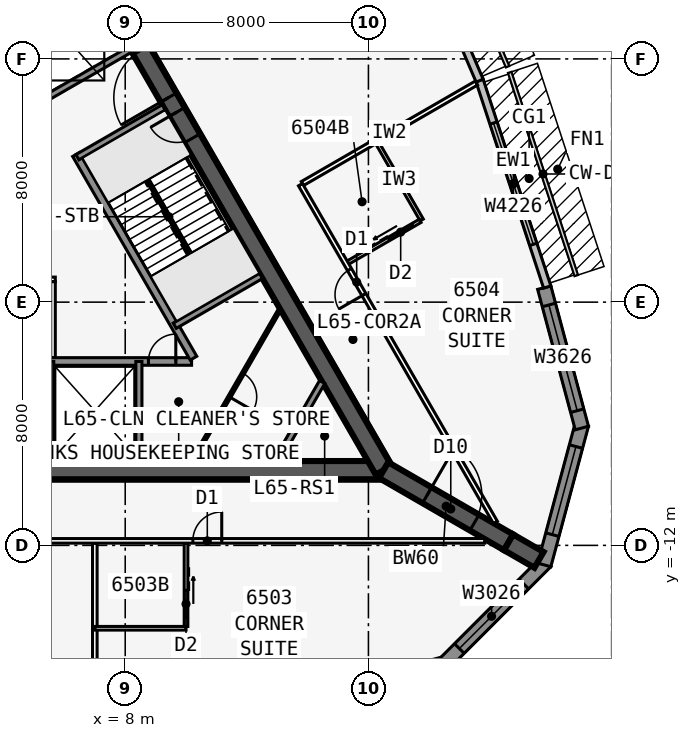
"""IFC4 building model, lengths in metres.
Left out: names, types, materials, properties, quantities, classifications, styles, units other than length and angle.
Written with IfcOpenShell. Run it as: python <this file> out.ifc"""

import sys

from ifc_helpers import new_model, si_unit, direction, frame, frame_2d, origin, place, context, subcontext, project, spatial, polyline, rectangle, outline, extrude, element, fill, save


model = new_model("IFC4")
c1 = context("Model", 3, precision=1e-05, world=origin(), true_north=direction((0.0, 1.0)))
c2 = subcontext(c1, "Body", "Model", "MODEL_VIEW")
j1 = project(units=[si_unit("LENGTHUNIT", "METRE"), si_unit("PLANEANGLEUNIT", "RADIAN")], contexts=[c1])
p1 = place(None, origin())
s1 = spatial("IfcSite", under=j1, at=p1, CompositionType="ELEMENT")
p2 = place(p1, origin())
s2 = spatial("IfcBuilding", under=s1, at=p2, CompositionType="ELEMENT")
p3 = place(p2, frame((0.0, 0.0, 246.5)))
s3 = spatial("IfcBuildingStorey", under=s2, at=p3, CompositionType="ELEMENT", Elevation=246.5)
p4 = place(p3, frame((-16.5, -9.526, 0.0), z_axis=(0.0, 0.0, 1.0), x_axis=(1.0, 0.0, 0.0)))
e1 = element("IfcWall", 1, at=p4, inside=s3, PredefinedType="SHEAR", context=c2, shape_type="SweptSolid", body=[
    extrude(rectangle(XDim=33.0, YDim=0.6, at=frame_2d((16.5, 0.0))), origin(), (0.0, 0.0, 1.0), 3.6),
])
p5 = place(p4, frame((14.05, 0.0, 0.0)))
e2 = element("IfcOpeningElement", 2, at=p5, cuts=e1, PredefinedType="OPENING", context=c2, shape_type="SweptSolid", body=[
    extrude(rectangle(XDim=1.8, YDim=2.13, at=frame_2d((0.9, 1.065))), frame((0.0, 0.31, 0.0), z_axis=(0.0, -1.0, 0.0), x_axis=(1.0, 0.0, 0.0)), (0.0, 0.0, 1.0), 0.62),
])
p6 = place(p3, frame((-0.55, -5.951, 0.0), z_axis=(0.0, 0.0, 1.0), x_axis=(1.0, 0.0, 0.0)))
e3 = element("IfcWall", 3, at=p6, inside=s3, PredefinedType="SOLIDWALL", context=c2, shape_type="SweptSolid", body=[
    extrude(rectangle(XDim=10.733, YDim=0.25, at=frame_2d((5.366, 0.0))), origin(), (0.0, 0.0, 1.0), 3.435),
])
p7 = place(p6, frame((9.314, 0.0, 0.0)))
e4 = element("IfcOpeningElement", 4, at=p7, cuts=e3, PredefinedType="OPENING", context=c2, shape_type="SweptSolid", body=[
    extrude(rectangle(XDim=0.9, YDim=2.13, at=frame_2d((0.45, 1.065))), frame((0.0, 0.135, 0.0), z_axis=(0.0, -1.0, 0.0), x_axis=(1.0, 0.0, 0.0)), (0.0, 0.0, 1.0), 0.27),
])
p8 = place(p6, frame((1.05, 0.0, 0.0)))
e5 = element("IfcOpeningElement", 5, at=p8, cuts=e3, PredefinedType="OPENING", context=c2, shape_type="SweptSolid", body=[
    extrude(rectangle(XDim=1.1, YDim=2.13, at=frame_2d((0.55, 1.065))), frame((0.0, 0.135, 0.0), z_axis=(0.0, -1.0, 0.0), x_axis=(1.0, 0.0, 0.0)), (0.0, 0.0, 1.0), 0.27),
])
p9 = place(p6, frame((4.05, 0.0, 0.0)))
e6 = element("IfcOpeningElement", 6, at=p9, cuts=e3, PredefinedType="OPENING", context=c2, shape_type="SweptSolid", body=[
    extrude(rectangle(XDim=1.1, YDim=2.13, at=frame_2d((0.55, 1.065))), frame((0.0, 0.135, 0.0), z_axis=(0.0, -1.0, 0.0), x_axis=(1.0, 0.0, 0.0)), (0.0, 0.0, 1.0), 0.27),
])
for number, where, z_axis, x_axis in (
    (7, (5.55, -5.951, 0.0), (0.0, 0.0, 1.0), (0.0, -1.0, 0.0)),
    (8, (8.45, -5.951, 0.0), (0.0, 0.0, 1.0), (0.0, -1.0, 0.0)),
):
    element("IfcWall", number, at=place(p3, frame(where, z_axis=z_axis, x_axis=x_axis)), inside=s3, PredefinedType="SOLIDWALL", context=c2, shape_type="SweptSolid", body=[
        extrude(rectangle(XDim=3.275, YDim=0.2, at=frame_2d((1.637, 0.0))), origin(), (0.0, 0.0, 1.0), 3.435),
    ])
p10 = place(p3, frame((16.5, -9.526, 0.0), z_axis=(0.0, 0.0, 1.0), x_axis=(-0.499999749417, 0.866025548458, 0.0)))
e9 = element("IfcWall", 9, at=p10, inside=s3, PredefinedType="SHEAR", context=c2, shape_type="SweptSolid", body=[
    extrude(rectangle(XDim=33.0, YDim=0.6, at=frame_2d((16.5, 0.0))), origin(), (0.0, 0.0, 1.0), 3.6),
])
p11 = place(p10, frame((14.15, 0.0, 0.0)))
e10 = element("IfcOpeningElement", 10, at=p11, cuts=e9, PredefinedType="OPENING", context=c2, shape_type="SweptSolid", body=[
    extrude(rectangle(XDim=1.8, YDim=2.13, at=frame_2d((0.9, 1.065))), frame((0.0, 0.31, 0.0), z_axis=(0.0, -1.0, 0.0), x_axis=(1.0, 0.0, 0.0)), (0.0, 0.0, 1.0), 0.62),
])
p12 = place(p10, frame((12.6, 0.0, 0.0)))
e11 = element("IfcOpeningElement", 11, at=p12, cuts=e9, PredefinedType="OPENING", context=c2, shape_type="SweptSolid", body=[
    extrude(rectangle(XDim=1.0, YDim=2.13, at=frame_2d((0.5, 1.065))), frame((0.0, 0.31, 0.0), z_axis=(0.0, -1.0, 0.0), x_axis=(1.0, 0.0, 0.0)), (0.0, 0.0, 1.0), 0.62),
])
p13 = place(p3, frame((10.245, -5.843, 0.0), z_axis=(0.0, 0.0, 1.0), x_axis=(-0.499993009313, 0.866029439822, 0.0)))
e12 = element("IfcWall", 12, at=p13, inside=s3, PredefinedType="SOLIDWALL", context=c2, shape_type="SweptSolid", body=[
    extrude(rectangle(XDim=7.733, YDim=0.25, at=frame_2d((3.866, 0.0))), origin(), (0.0, 0.0, 1.0), 3.435),
])
p14 = place(p3, frame((9.629, -4.775, 0.0), z_axis=(0.0, 0.0, 1.0), x_axis=(0.865995643347, 0.500051543047, 0.0)))
e13 = element("IfcWall", 13, at=p14, inside=s3, PredefinedType="SOLIDWALL", context=c2, shape_type="SweptSolid", body=[
    extrude(rectangle(XDim=3.275, YDim=0.2, at=frame_2d((1.638, 0.0))), origin(), (0.0, 0.0, 1.0), 3.435),
])
for number, where, z_axis, x_axis in (
    (14, (6.429, 0.767, 0.0), (0.0, 0.0, 1.0), (0.866, 0.5, 0.0)),
    (15, (5.329, 2.673, 0.0), (0.0, 0.0, 1.0), (0.866, 0.5, 0.0)),
):
    element("IfcWall", number, at=place(p3, frame(where, z_axis=z_axis, x_axis=x_axis)), inside=s3, PredefinedType="SOLIDWALL", context=c2, shape_type="SweptSolid", body=[
        extrude(rectangle(XDim=3.275, YDim=0.2, at=frame_2d((1.637, 0.0))), origin(), (0.0, 0.0, 1.0), 3.435),
    ])
p15 = place(p3, frame((16.5, -9.526, 0.0), z_axis=(0.0, 0.0, 1.0), x_axis=(0.866031398331, -0.499989616998, 0.0)))
e16 = element("IfcWall", 16, at=p15, inside=s3, PredefinedType="SHEAR", context=c2, shape_type="SweptSolid", body=[
    extrude(rectangle(XDim=4.746, YDim=0.6, at=frame_2d((2.373, 0.0))), origin(), (0.0, 0.0, 1.0), 3.6),
])
p16 = place(p15, frame((1.65, 0.0, 0.0)))
e17 = element("IfcOpeningElement", 17, at=p16, cuts=e16, PredefinedType="OPENING", context=c2, shape_type="SweptSolid", body=[
    extrude(rectangle(XDim=1.8, YDim=2.13, at=frame_2d((0.9, 1.065))), frame((0.0, 0.31, 0.0), z_axis=(0.0, -1.0, 0.0), x_axis=(1.0, 0.0, 0.0)), (0.0, 0.0, 1.0), 0.62),
])
p17 = place(p3, frame((20.61, -11.899, 0.0), z_axis=(0.0, 0.0, 1.0), x_axis=(0.866009537788, -0.500027479704, 0.0)))
e18 = element("IfcWall", 18, at=p17, inside=s3, PredefinedType="SHEAR", context=c2, shape_type="SweptSolid", body=[
    extrude(rectangle(XDim=1.155, YDim=0.6, at=frame_2d((0.577, 0.0))), origin(), (0.0, 0.0, 1.0), 3.6),
])
p18 = place(p3, frame((13.942, -17.103, 0.0), z_axis=(0.0, 0.0, 1.0), x_axis=(0.965913862671, 0.258863689806, 0.0)))
e19 = element("IfcWall", 19, at=p18, inside=s3, PredefinedType="SOLIDWALL", context=c2, shape_type="SweptSolid", body=[
    extrude(rectangle(XDim=4.782, YDim=0.45, at=frame_2d((2.391, 0.0))), origin(), (0.0, 0.0, 1.0), 3.435),
])
p19 = place(p18, frame((0.591, 0.0, 0.45)))
e20 = element("IfcOpeningElement", 20, at=p19, cuts=e19, PredefinedType="OPENING", context=c2, shape_type="SweptSolid", body=[
    extrude(rectangle(XDim=3.6, YDim=2.6, at=frame_2d((1.8, 1.3))), frame((0.0, 0.235, 0.0), z_axis=(0.0, -1.0, 0.0), x_axis=(1.0, 0.0, 0.0)), (0.0, 0.0, 1.0), 0.47),
])
p20 = place(p3, frame((18.46, -15.924, 0.0), z_axis=(0.0, 0.0, 1.0), x_axis=(0.707081252484, 0.707132308968, 0.0)))
e21 = element("IfcWall", 21, at=p20, inside=s3, PredefinedType="SOLIDWALL", context=c2, shape_type="SweptSolid", body=[
    extrude(outline(polyline([(4.782, 0.225), (4.723, 0.225), (4.375, 0.132), (4.351, 0.225), (0.0, 0.225), (0.0, -0.225), (4.782, -0.225), (4.782, 0.225)])), origin(), (0.0, 0.0, 1.0), 3.435),
])
p21 = place(p20, frame((0.75, 0.0, 0.45)))
e22 = element("IfcOpeningElement", 22, at=p21, cuts=e21, PredefinedType="OPENING", context=c2, shape_type="SweptSolid", body=[
    extrude(rectangle(XDim=3.0, YDim=2.6, at=frame_2d((1.5, 1.3))), frame((0.0, 0.235, 0.0), z_axis=(0.0, -1.0, 0.0), x_axis=(1.0, 0.0, 0.0)), (0.0, 0.0, 1.0), 0.47),
])
p22 = place(p3, frame((21.783, -12.644, 0.0), z_axis=(0.0, 0.0, 1.0), x_axis=(0.25880328844, 0.965930048136, 0.0)))
e23 = element("IfcWall", 23, at=p22, inside=s3, PredefinedType="SOLIDWALL", context=c2, shape_type="SweptSolid", body=[
    extrude(outline(polyline([(4.782, 0.225), (0.431, 0.225), (0.406, 0.132), (0.06, 0.225), (0.0, 0.225), (0.0, -0.225), (4.782, -0.225), (4.782, 0.225)])), origin(), (0.0, 0.0, 1.0), 3.435),
])
p23 = place(p22, frame((1.031, 0.0, 0.45)))
e24 = element("IfcOpeningElement", 24, at=p23, cuts=e23, PredefinedType="OPENING", context=c2, shape_type="SweptSolid", body=[
    extrude(rectangle(XDim=3.0, YDim=2.6, at=frame_2d((1.5, 1.3))), frame((0.0, 0.235, 0.0), z_axis=(0.0, -1.0, 0.0), x_axis=(1.0, 0.0, 0.0)), (0.0, 0.0, 1.0), 0.47),
])
p24 = place(p3, frame((23.02, -8.141, 0.0), z_axis=(0.0, 0.0, 1.0), x_axis=(-0.25880328844, 0.965930048136, 0.0)))
e25 = element("IfcWall", 25, at=p24, inside=s3, PredefinedType="SOLIDWALL", context=c2, shape_type="SweptSolid", body=[
    extrude(rectangle(XDim=4.782, YDim=0.45, at=frame_2d((2.391, 0.0))), origin(), (0.0, 0.0, 1.0), 3.435),
])
p25 = place(p24, frame((0.591, 0.0, 0.45)))
e26 = element("IfcOpeningElement", 26, at=p25, cuts=e25, PredefinedType="OPENING", context=c2, shape_type="SweptSolid", body=[
    extrude(rectangle(XDim=3.6, YDim=2.6, at=frame_2d((1.8, 1.3))), frame((0.0, 0.235, 0.0), z_axis=(0.0, -1.0, 0.0), x_axis=(1.0, 0.0, 0.0)), (0.0, 0.0, 1.0), 0.47),
])
p26 = place(p3, frame((21.881, -3.503, 0.0), z_axis=(0.0, 0.0, 1.0), x_axis=(-0.311328857048, 0.95030223759, 0.0)))
e27 = element("IfcWall", 27, at=p26, inside=s3, PredefinedType="STANDARD", context=c2, shape_type="SweptSolid", body=[
    extrude(rectangle(XDim=7.153, YDim=0.25, at=frame_2d((3.576, 0.0))), origin(), (0.0, 0.0, 1.0), 3.435),
])
p27 = place(p26, frame((1.476, 0.0, 0.45)))
e28 = element("IfcOpeningElement", 28, at=p27, cuts=e27, PredefinedType="OPENING", context=c2, shape_type="SweptSolid", body=[
    extrude(rectangle(XDim=4.2, YDim=2.6, at=frame_2d((2.1, 1.3))), frame((0.0, 0.135, 0.0), z_axis=(0.0, -1.0, 0.0), x_axis=(1.0, 0.0, 0.0)), (0.0, 0.0, 1.0), 0.27),
])
p28 = place(p3, frame((19.658, 3.284, 0.0), z_axis=(0.0, 0.0, 1.0), x_axis=(-0.393290226175, 0.91941437774, 0.0)))
e29 = element("IfcWall", 29, at=p28, inside=s3, PredefinedType="STANDARD", context=c2, shape_type="SweptSolid", body=[
    extrude(rectangle(XDim=2.014, YDim=0.25, at=frame_2d((1.007, 0.0))), origin(), (0.0, 0.0, 1.0), 3.435),
])
p29 = place(p3, frame((-19.827, -11.851, 0.0), z_axis=(0.0, 0.0, 1.0), x_axis=(1.0, 0.0, 0.0)))
e30 = element("IfcWall", 30, at=p29, inside=s3, PredefinedType="PARTITIONING", context=c2, shape_type="SweptSolid", body=[
    extrude(rectangle(XDim=39.654, YDim=0.15, at=frame_2d((19.827, 0.0))), origin(), (0.0, 0.0, 1.0), 3.435),
])
p30 = place(p29, frame((8.652, 0.0, 0.0)))
e31 = element("IfcOpeningElement", 31, at=p30, cuts=e30, PredefinedType="OPENING", context=c2, shape_type="SweptSolid", body=[
    extrude(rectangle(XDim=0.95, YDim=2.13, at=frame_2d((0.475, 1.065))), frame((0.0, 0.085, 0.0), z_axis=(0.0, -1.0, 0.0), x_axis=(1.0, 0.0, 0.0)), (0.0, 0.0, 1.0), 0.17),
])
p31 = place(p29, frame((15.827, 0.0, 0.0)))
e32 = element("IfcOpeningElement", 32, at=p31, cuts=e30, PredefinedType="OPENING", context=c2, shape_type="SweptSolid", body=[
    extrude(rectangle(XDim=1.0, YDim=2.13, at=frame_2d((0.5, 1.065))), frame((0.0, 0.085, 0.0), z_axis=(0.0, -1.0, 0.0), x_axis=(1.0, 0.0, 0.0)), (0.0, 0.0, 1.0), 0.17),
])
p32 = place(p29, frame((23.052, 0.0, 0.0)))
e33 = element("IfcOpeningElement", 33, at=p32, cuts=e30, PredefinedType="OPENING", context=c2, shape_type="SweptSolid", body=[
    extrude(rectangle(XDim=0.95, YDim=2.13, at=frame_2d((0.475, 1.065))), frame((0.0, 0.085, 0.0), z_axis=(0.0, -1.0, 0.0), x_axis=(1.0, 0.0, 0.0)), (0.0, 0.0, 1.0), 0.17),
])
p33 = place(p29, frame((30.052, 0.0, 0.0)))
e34 = element("IfcOpeningElement", 34, at=p33, cuts=e30, PredefinedType="OPENING", context=c2, shape_type="SweptSolid", body=[
    extrude(rectangle(XDim=0.95, YDim=2.13, at=frame_2d((0.475, 1.065))), frame((0.0, 0.085, 0.0), z_axis=(0.0, -1.0, 0.0), x_axis=(1.0, 0.0, 0.0)), (0.0, 0.0, 1.0), 0.17),
])
p34 = place(p3, frame((7.0, -11.926, 0.0), z_axis=(0.0, 0.0, 1.0), x_axis=(0.0, -1.0, 0.0)))
e35 = element("IfcWall", 35, at=p34, inside=s3, PredefinedType="PARTITIONING", context=c2, shape_type="SweptSolid", body=[
    extrude(rectangle(XDim=6.609, YDim=0.15, at=frame_2d((3.304, 0.0))), origin(), (0.0, 0.0, 1.0), 2.678),
])
p35 = place(p3, frame((7.0, -14.726, 0.0), z_axis=(0.0, 0.0, 1.0), x_axis=(1.0, 0.0, 0.0)))
e36 = element("IfcWall", 36, at=p35, inside=s3, PredefinedType="PLUMBINGWALL", context=c2, shape_type="SweptSolid", body=[
    extrude(rectangle(XDim=3.0, YDim=0.12, at=frame_2d((1.5, 0.0))), origin(), (0.0, 0.0, 1.0), 3.435),
])
p36 = place(p3, frame((10.0, -11.926, 0.0), z_axis=(0.0, 0.0, 1.0), x_axis=(0.0, -1.0, 0.0)))
e37 = element("IfcWall", 37, at=p36, inside=s3, PredefinedType="PLUMBINGWALL", context=c2, shape_type="SweptSolid", body=[
    extrude(rectangle(XDim=2.74, YDim=0.12, at=frame_2d((1.37, 0.0))), origin(), (0.0, 0.0, 1.0), 3.435),
])
p37 = place(p36, frame((1.55, 0.0, 0.0)))
e38 = element("IfcOpeningElement", 38, at=p37, cuts=e37, PredefinedType="OPENING", context=c2, shape_type="SweptSolid", body=[
    extrude(rectangle(XDim=0.9, YDim=2.13, at=frame_2d((0.45, 1.065))), frame((0.0, 0.07, 0.0), z_axis=(0.0, -1.0, 0.0), x_axis=(1.0, 0.0, 0.0)), (0.0, 0.0, 1.0), 0.14),
])
p38 = place(p3, frame((20.177, -11.245, 0.0), z_axis=(0.0, 0.0, 1.0), x_axis=(-0.49999979161, 0.866025524098, 0.0)))
e39 = element("IfcWall", 39, at=p38, inside=s3, PredefinedType="PARTITIONING", context=c2, shape_type="SweptSolid", body=[
    extrude(rectangle(XDim=12.827, YDim=0.15, at=frame_2d((6.414, 0.0))), origin(), (0.0, 0.0, 1.0), 3.435),
])
p39 = place(p38, frame((8.652, 0.0, 0.0)))
e40 = element("IfcOpeningElement", 40, at=p39, cuts=e39, PredefinedType="OPENING", context=c2, shape_type="SweptSolid", body=[
    extrude(rectangle(XDim=0.95, YDim=2.13, at=frame_2d((0.475, 1.065))), frame((0.0, 0.085, 0.0), z_axis=(0.0, -1.0, 0.0), x_axis=(1.0, 0.0, 0.0)), (0.0, 0.0, 1.0), 0.17),
])
p40 = place(p3, frame((13.829, -0.099, 0.0), z_axis=(0.0, 0.0, 1.0), x_axis=(0.866022562216, 0.500004921708, 0.0)))
e41 = element("IfcWall", 41, at=p40, inside=s3, PredefinedType="PARTITIONING", context=c2, shape_type="SweptSolid", body=[
    extrude(rectangle(XDim=6.609, YDim=0.15, at=frame_2d((3.304, 0.0))), origin(), (0.0, 0.0, 1.0), 2.678),
])
p41 = place(p3, frame((17.753, -1.297, 0.0), z_axis=(0.0, 0.0, 1.0), x_axis=(-0.499990139034, 0.866031096941, 0.0)))
e42 = element("IfcWall", 42, at=p41, inside=s3, PredefinedType="PLUMBINGWALL", context=c2, shape_type="SweptSolid", body=[
    extrude(rectangle(XDim=3.0, YDim=0.12, at=frame_2d((1.5, 0.0))), origin(), (0.0, 0.0, 1.0), 3.435),
])
p42 = place(p3, frame((15.329, -2.697, 0.0), z_axis=(0.0, 0.0, 1.0), x_axis=(0.866035715982, 0.499982138324, 0.0)))
e43 = element("IfcWall", 43, at=p42, inside=s3, PredefinedType="PLUMBINGWALL", context=c2, shape_type="SweptSolid", body=[
    extrude(rectangle(XDim=2.74, YDim=0.12, at=frame_2d((1.37, 0.0))), origin(), (0.0, 0.0, 1.0), 3.435),
])
p43 = place(p42, frame((1.55, 0.0, 0.0)))
e44 = element("IfcOpeningElement", 44, at=p43, cuts=e43, PredefinedType="OPENING", context=c2, shape_type="SweptSolid", body=[
    extrude(rectangle(XDim=0.9, YDim=2.13, at=frame_2d((0.45, 1.065))), frame((0.0, 0.07, 0.0), z_axis=(0.0, -1.0, 0.0), x_axis=(1.0, 0.0, 0.0)), (0.0, 0.0, 1.0), 0.14),
])
p44 = place(p3, frame((-2.65, -3.251, 0.0), z_axis=(0.0, 0.0, 1.0), x_axis=(1.0, 0.0, 0.0)))
e45 = element("IfcWall", 45, at=p44, inside=s3, PredefinedType="PARTITIONING", context=c2, shape_type="SweptSolid", body=[
    extrude(rectangle(XDim=8.35, YDim=0.15, at=frame_2d((4.175, 0.0))), origin(), (0.0, 0.0, 1.0), 3.435),
])
p45 = place(p3, frame((5.625, -5.826, 0.0), z_axis=(0.0, 0.0, 1.0), x_axis=(0.0, 1.0, 0.0)))
e46 = element("IfcWall", 46, at=p45, inside=s3, PredefinedType="PARTITIONING", context=c2, shape_type="SweptSolid", body=[
    extrude(rectangle(XDim=2.5, YDim=0.15, at=frame_2d((1.25, 0.0))), origin(), (0.0, 0.0, 1.0), 3.435),
])
p46 = place(p3, frame((14.479, -6.626, 0.0), z_axis=(0.0, 0.0, 1.0), x_axis=(-0.499952404951, -0.866052881055, 0.0)))
e47 = element("IfcWall", 47, at=p46, inside=s3, PredefinedType="SOLIDWALL", context=c2, shape_type="SweptSolid", body=[
    extrude(rectangle(XDim=3.002, YDim=0.2, at=frame_2d((1.501, 0.0))), origin(), (0.0, 0.0, 1.0), 3.435),
])
p47 = place(p3, frame((13.094, -4.226, 0.0), z_axis=(0.0, 0.0, 1.0), x_axis=(-0.500027479704, -0.866009537788, 0.0)))
e48 = element("IfcWall", 48, at=p47, inside=s3, PredefinedType="PARTITIONING", context=c2, shape_type="SweptSolid", body=[
    extrude(rectangle(XDim=5.774, YDim=0.1, at=frame_2d((2.887, 0.0))), origin(), (0.0, 0.0, 1.0), 3.435),
])
p48 = place(p47, frame((2.437, 0.0, 0.0)))
e49 = element("IfcOpeningElement", 49, at=p48, cuts=e48, PredefinedType="OPENING", context=c2, shape_type="SweptSolid", body=[
    extrude(rectangle(XDim=0.9, YDim=2.13, at=frame_2d((0.45, 1.065))), frame((0.0, 0.06, 0.0), z_axis=(0.0, -1.0, 0.0), x_axis=(1.0, 0.0, 0.0)), (0.0, 0.0, 1.0), 0.12),
])
p49 = place(p3, frame((10.135, -2.401, 0.0), z_axis=(0.0, 0.0, 1.0), x_axis=(-0.499992232847, 0.866029888106, 0.0)))
e50 = element("IfcWall", 50, at=p49, inside=s3, PredefinedType="SOLIDWALL", context=c2, shape_type="SweptSolid", body=[
    extrude(rectangle(XDim=2.794, YDim=0.1, at=frame_2d((1.397, 0.0))), origin(), (0.0, 0.0, 1.0), 3.6),
])
p50 = place(p21, origin())
e51 = element("IfcWindow", 51, at=p50, inside=s3, PartitioningType="SINGLE_PANEL", PredefinedType="WINDOW", context=c2, shape_type="SweptSolid", body=[
    extrude(rectangle(XDim=3.0, YDim=2.6, at=frame_2d((1.5, 1.3))), frame((0.0, 0.03, 0.0), z_axis=(0.0, -1.0, 0.0), x_axis=(1.0, 0.0, 0.0)), (0.0, 0.0, 1.0), 0.06),
])
fill(e22, e51)
p51 = place(p23, origin())
e52 = element("IfcWindow", 52, at=p51, inside=s3, PartitioningType="SINGLE_PANEL", PredefinedType="WINDOW", context=c2, shape_type="SweptSolid", body=[
    extrude(rectangle(XDim=3.0, YDim=2.6, at=frame_2d((1.5, 1.3))), frame((0.0, 0.03, 0.0), z_axis=(0.0, -1.0, 0.0), x_axis=(1.0, 0.0, 0.0)), (0.0, 0.0, 1.0), 0.06),
])
fill(e24, e52)
p52 = place(p25, origin())
e53 = element("IfcWindow", 53, at=p52, inside=s3, PartitioningType="SINGLE_PANEL", PredefinedType="WINDOW", context=c2, shape_type="SweptSolid", body=[
    extrude(rectangle(XDim=3.6, YDim=2.6, at=frame_2d((1.8, 1.3))), frame((0.0, 0.03, 0.0), z_axis=(0.0, -1.0, 0.0), x_axis=(1.0, 0.0, 0.0)), (0.0, 0.0, 1.0), 0.06),
])
fill(e26, e53)
p53 = place(p27, origin())
e54 = element("IfcWindow", 54, at=p53, inside=s3, PartitioningType="SINGLE_PANEL", PredefinedType="WINDOW", context=c2, shape_type="SweptSolid", body=[
    extrude(rectangle(XDim=4.2, YDim=2.6, at=frame_2d((2.1, 1.3))), frame((0.0, 0.03, 0.0), z_axis=(0.0, -1.0, 0.0), x_axis=(1.0, 0.0, 0.0)), (0.0, 0.0, 1.0), 0.06),
])
fill(e28, e54)
p54 = place(p37, origin())
e55 = element("IfcDoor", 55, at=p54, inside=s3, OperationType="SLIDING_TO_LEFT", PredefinedType="DOOR", context=c2, shape_type="SweptSolid", body=[
    extrude(rectangle(XDim=0.9, YDim=2.13, at=frame_2d((0.45, 1.065))), frame((0.0, 0.025, 0.0), z_axis=(0.0, -1.0, 0.0), x_axis=(1.0, 0.0, 0.0)), (0.0, 0.0, 1.0), 0.05),
])
fill(e38, e55)
p55 = place(p33, origin())
e56 = element("IfcDoor", 56, at=p55, inside=s3, OperationType="SINGLE_SWING_RIGHT", PredefinedType="DOOR", context=c2, shape_type="SweptSolid", body=[
    extrude(rectangle(XDim=0.95, YDim=2.13, at=frame_2d((0.475, 1.065))), frame((0.0, 0.025, 0.0), z_axis=(0.0, -1.0, 0.0), x_axis=(1.0, 0.0, 0.0)), (0.0, 0.0, 1.0), 0.05),
])
fill(e34, e56)
p56 = place(p43, origin())
e57 = element("IfcDoor", 57, at=p56, inside=s3, OperationType="SLIDING_TO_LEFT", PredefinedType="DOOR", context=c2, shape_type="SweptSolid", body=[
    extrude(rectangle(XDim=0.9, YDim=2.13, at=frame_2d((0.45, 1.065))), frame((0.0, 0.025, 0.0), z_axis=(0.0, -1.0, 0.0), x_axis=(1.0, 0.0, 0.0)), (0.0, 0.0, 1.0), 0.05),
])
fill(e44, e57)
p57 = place(p39, origin())
e58 = element("IfcDoor", 58, at=p57, inside=s3, OperationType="SINGLE_SWING_LEFT", PredefinedType="DOOR", context=c2, shape_type="SweptSolid", body=[
    extrude(rectangle(XDim=0.95, YDim=2.13, at=frame_2d((0.475, 1.065))), frame((0.0, 0.025, 0.0), z_axis=(0.0, -1.0, 0.0), x_axis=(1.0, 0.0, 0.0)), (0.0, 0.0, 1.0), 0.05),
])
fill(e40, e58)
p58 = place(p11, origin())
e59 = element("IfcDoor", 59, at=p58, inside=s3, OperationType="DOUBLE_DOOR_SINGLE_SWING", PredefinedType="DOOR", context=c2, shape_type="SweptSolid", body=[
    extrude(rectangle(XDim=1.8, YDim=2.13, at=frame_2d((0.9, 1.065))), frame((0.0, 0.025, 0.0), z_axis=(0.0, -1.0, 0.0), x_axis=(1.0, 0.0, 0.0)), (0.0, 0.0, 1.0), 0.05),
])
fill(e10, e59)
p59 = place(p12, origin())
e60 = element("IfcDoor", 60, at=p59, inside=s3, OperationType="SINGLE_SWING_RIGHT", PredefinedType="DOOR", context=c2, shape_type="SweptSolid", body=[
    extrude(rectangle(XDim=1.0, YDim=2.13, at=frame_2d((0.5, 1.065))), frame((0.0, 0.025, 0.0), z_axis=(0.0, -1.0, 0.0), x_axis=(1.0, 0.0, 0.0)), (0.0, 0.0, 1.0), 0.05),
])
fill(e11, e60)
p60 = place(p16, origin())
e61 = element("IfcDoor", 61, at=p60, inside=s3, OperationType="DOUBLE_DOOR_DOUBLE_SWING", PredefinedType="DOOR", context=c2, shape_type="SweptSolid", body=[
    extrude(rectangle(XDim=1.8, YDim=2.13, at=frame_2d((0.9, 1.065))), frame((0.0, 0.025, 0.0), z_axis=(0.0, -1.0, 0.0), x_axis=(1.0, 0.0, 0.0)), (0.0, 0.0, 1.0), 0.05),
])
fill(e17, e61)
p61 = place(p48, origin())
e62 = element("IfcDoor", 62, at=p61, inside=s3, OperationType="SINGLE_SWING_RIGHT", PredefinedType="DOOR", context=c2, shape_type="SweptSolid", body=[
    extrude(rectangle(XDim=0.9, YDim=2.13, at=frame_2d((0.45, 1.065))), frame((0.0, 0.025, 0.0), z_axis=(0.0, -1.0, 0.0), x_axis=(1.0, 0.0, 0.0)), (0.0, 0.0, 1.0), 0.05),
])
fill(e49, e62)
p62 = place(p7, origin())
e63 = element("IfcDoor", 63, at=p62, inside=s3, OperationType="SINGLE_SWING_RIGHT", PredefinedType="DOOR", context=c2, shape_type="SweptSolid", body=[
    extrude(rectangle(XDim=0.9, YDim=2.13, at=frame_2d((0.45, 1.065))), frame((0.0, 0.025, 0.0), z_axis=(0.0, -1.0, 0.0), x_axis=(1.0, 0.0, 0.0)), (0.0, 0.0, 1.0), 0.05),
])
fill(e4, e63)
save(model, sys.argv[1])
